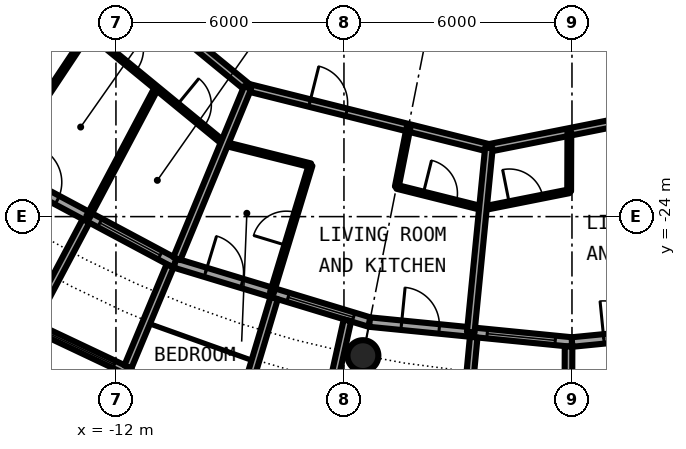
"""IFC4 building model, lengths in metres.
Left out: names, types, materials, properties, quantities, classifications, styles, units other than length and angle.
Written with IfcOpenShell. Run it as: python <this file> out.ifc"""

import sys

from ifc_helpers import new_model, si_unit, direction, frame, frame_2d, origin, origin_2d, place, context, subcontext, project, spatial, rectangle, circle, hollow_circle, extrude, element, fill, save


model = new_model("IFC4")
c1 = context("Model", 3, precision=1e-05, world=origin(), true_north=direction((0.0, 1.0)))
c2 = subcontext(c1, "Body", "Model", "MODEL_VIEW")
j1 = project(units=[si_unit("LENGTHUNIT", "METRE"), si_unit("PLANEANGLEUNIT", "RADIAN")], contexts=[c1])
p1 = place(None, origin())
s1 = spatial("IfcSite", under=j1, at=p1, CompositionType="ELEMENT")
p2 = place(p1, origin())
s2 = spatial("IfcBuilding", under=s1, at=p2, CompositionType="ELEMENT")
p3 = place(p2, frame((0.0, 0.0, 227.95)))
s3 = spatial("IfcBuildingStorey", under=s2, at=p3, CompositionType="ELEMENT", Elevation=227.95)
p4 = place(p3, frame((-5.501, -27.658, 0.0), z_axis=(0.0, 0.0, 1.0), x_axis=(1.0, 0.0, 0.0)))
e1 = element("IfcColumn", 1, at=p4, inside=s3, PredefinedType="COLUMN", context=c2, shape_type="SweptSolid", body=[
    extrude(hollow_circle(Radius=0.406, WallThickness=0.03, at=origin_2d()), origin(), (0.0, 0.0, 1.0), 3.05),
])
p5 = place(p3, frame((-15.167, -22.699, 0.0), z_axis=(0.0, 0.0, 1.0), x_axis=(0.881915646801, -0.471407246368, 0.0)))
e2 = element("IfcWall", 2, at=p5, inside=s3, PredefinedType="SOLIDWALL", context=c2, shape_type="SweptSolid", body=[
    extrude(rectangle(XDim=5.352, YDim=0.25, at=frame_2d((2.676, 0.0))), origin(), (0.0, 0.0, 1.0), 2.7),
])
p6 = place(p5, frame((0.841, 0.0, 0.0)))
e3 = element("IfcOpeningElement", 3, at=p6, cuts=e2, PredefinedType="OPENING", context=c2, shape_type="SweptSolid", body=[
    extrude(rectangle(XDim=1.0, YDim=2.2, at=frame_2d((0.5, 1.1))), frame((0.0, 0.135, 0.0), z_axis=(0.0, -1.0, 0.0), x_axis=(1.0, 0.0, 0.0)), (0.0, 0.0, 1.0), 0.27),
])
p7 = place(p5, frame((3.111, 0.0, 0.3)))
e4 = element("IfcOpeningElement", 4, at=p7, cuts=e2, PredefinedType="OPENING", context=c2, shape_type="SweptSolid", body=[
    extrude(rectangle(XDim=1.8, YDim=2.1, at=frame_2d((0.9, 1.05))), frame((0.0, 0.135, 0.0), z_axis=(0.0, -1.0, 0.0), x_axis=(1.0, 0.0, 0.0)), (0.0, 0.0, 1.0), 0.27),
])
p8 = place(p3, frame((-14.335, -26.808, -0.03), z_axis=(0.0, 0.0, 1.0), x_axis=(0.904000060331, -0.427532327342, 0.0)))
e5 = element("IfcWall", 5, at=p8, inside=s3, PredefinedType="SOLIDWALL", context=c2, shape_type="SweptSolid", body=[
    extrude(rectangle(XDim=2.993, YDim=0.2, at=frame_2d((1.497, 0.0))), origin(), (0.0, 0.0, 1.0), 2.73),
])
p9 = place(p8, frame((0.457, 0.0, 0.33)))
e6 = element("IfcOpeningElement", 6, at=p9, cuts=e5, PredefinedType="OPENING", context=c2, shape_type="SweptSolid", body=[
    extrude(circle(Radius=1.04, at=frame_2d((1.04, 1.04))), frame((0.0, 0.11, 0.0), z_axis=(0.0, -1.0, 0.0), x_axis=(1.0, 0.0, 0.0)), (0.0, 0.0, 1.0), 0.22),
])
p10 = place(p3, frame((-12.787, -24.113, -0.03), z_axis=(0.0, 0.0, 1.0), x_axis=(-0.468365282436, -0.883534924159, 0.0)))
e7 = element("IfcWall", 7, at=p10, inside=s3, PredefinedType="SOLIDWALL", context=c2, shape_type="SweptSolid", body=[
    extrude(rectangle(XDim=3.006, YDim=0.2, at=frame_2d((1.503, 0.0))), origin(), (0.0, 0.0, 1.0), 2.73),
])
p11 = place(p3, frame((-10.575, -25.295, -0.03), z_axis=(0.0, 0.0, 1.0), x_axis=(-0.385697364644, -0.922625353492, 0.0)))
e8 = element("IfcWall", 8, at=p11, inside=s3, PredefinedType="SOLIDWALL", context=c2, shape_type="SweptSolid", body=[
    extrude(rectangle(XDim=2.883, YDim=0.2, at=frame_2d((1.442, 0.0))), origin(), (0.0, 0.0, 1.0), 2.73),
])
p12 = place(p3, frame((-10.447, -25.222, 0.0), z_axis=(0.0, 0.0, 1.0), x_axis=(0.956965678721, -0.290201119486, 0.0)))
e9 = element("IfcWall", 9, at=p12, inside=s3, PredefinedType="SOLIDWALL", context=c2, shape_type="SweptSolid", body=[
    extrude(rectangle(XDim=5.351, YDim=0.25, at=frame_2d((2.676, 0.0))), origin(), (0.0, 0.0, 1.0), 2.7),
])
p13 = place(p12, frame((0.841, 0.0, 0.0)))
e10 = element("IfcOpeningElement", 10, at=p13, cuts=e9, PredefinedType="OPENING", context=c2, shape_type="SweptSolid", body=[
    extrude(rectangle(XDim=1.0, YDim=2.2, at=frame_2d((0.5, 1.1))), frame((0.0, 0.135, 0.0), z_axis=(0.0, -1.0, 0.0), x_axis=(1.0, 0.0, 0.0)), (0.0, 0.0, 1.0), 0.27),
])
p14 = place(p12, frame((3.111, 0.0, 0.3)))
e11 = element("IfcOpeningElement", 11, at=p14, cuts=e9, PredefinedType="OPENING", context=c2, shape_type="SweptSolid", body=[
    extrude(rectangle(XDim=1.8, YDim=2.1, at=frame_2d((0.9, 1.05))), frame((0.0, 0.135, 0.0), z_axis=(0.0, -1.0, 0.0), x_axis=(1.0, 0.0, 0.0)), (0.0, 0.0, 1.0), 0.27),
])
p15 = place(p3, frame((-7.837, -26.144, -0.03), z_axis=(0.0, 0.0, 1.0), x_axis=(-0.287064767992, -0.957911174889, 0.0)))
e12 = element("IfcWall", 12, at=p15, inside=s3, PredefinedType="SOLIDWALL", context=c2, shape_type="SweptSolid", body=[
    extrude(rectangle(XDim=3.006, YDim=0.2, at=frame_2d((1.503, 0.0))), origin(), (0.0, 0.0, 1.0), 2.73),
])
p16 = place(p3, frame((-5.909, -26.729, -0.03), z_axis=(0.0, 0.0, 1.0), x_axis=(-0.216409053917, -0.976302781612, 0.0)))
e13 = element("IfcWall", 13, at=p16, inside=s3, PredefinedType="SOLIDWALL", context=c2, shape_type="SweptSolid", body=[
    extrude(rectangle(XDim=2.925, YDim=0.2, at=frame_2d((1.463, 0.0))), origin(), (0.0, 0.0, 1.0), 2.73),
])
p17 = place(p3, frame((-5.326, -26.775, 0.0), z_axis=(0.0, 0.0, 1.0), x_axis=(0.995173996315, -0.098126026407, 0.0)))
e14 = element("IfcWall", 14, at=p17, inside=s3, PredefinedType="SOLIDWALL", context=c2, shape_type="SweptSolid", body=[
    extrude(rectangle(XDim=5.352, YDim=0.25, at=frame_2d((2.676, 0.0))), origin(), (0.0, 0.0, 1.0), 2.7),
])
p18 = place(p17, frame((0.841, 0.0, 0.0)))
e15 = element("IfcOpeningElement", 15, at=p18, cuts=e14, PredefinedType="OPENING", context=c2, shape_type="SweptSolid", body=[
    extrude(rectangle(XDim=1.0, YDim=2.2, at=frame_2d((0.5, 1.1))), frame((0.0, 0.135, 0.0), z_axis=(0.0, -1.0, 0.0), x_axis=(1.0, 0.0, 0.0)), (0.0, 0.0, 1.0), 0.27),
])
p19 = place(p17, frame((3.111, 0.0, 0.3)))
e16 = element("IfcOpeningElement", 16, at=p19, cuts=e14, PredefinedType="OPENING", context=c2, shape_type="SweptSolid", body=[
    extrude(rectangle(XDim=1.8, YDim=2.1, at=frame_2d((0.9, 1.05))), frame((0.0, 0.135, 0.0), z_axis=(0.0, -1.0, 0.0), x_axis=(1.0, 0.0, 0.0)), (0.0, 0.0, 1.0), 0.27),
])
p20 = place(p3, frame((-2.586, -27.171, -0.03), z_axis=(0.0, 0.0, 1.0), x_axis=(-0.094548432284, -0.995520262954, 0.0)))
e17 = element("IfcWall", 17, at=p20, inside=s3, PredefinedType="SOLIDWALL", context=c2, shape_type="SweptSolid", body=[
    extrude(rectangle(XDim=3.006, YDim=0.2, at=frame_2d((1.503, 0.0))), origin(), (0.0, 0.0, 1.0), 2.73),
])
p21 = place(p3, frame((-0.09, -27.417, -0.03), z_axis=(0.0, 0.0, 1.0), x_axis=(-0.00347308367, -0.999993968827, 0.0)))
e18 = element("IfcWall", 18, at=p21, inside=s3, PredefinedType="SOLIDWALL", context=c2, shape_type="SweptSolid", body=[
    extrude(rectangle(XDim=2.882, YDim=0.2, at=frame_2d((1.441, 0.0))), origin(), (0.0, 0.0, 1.0), 2.73),
])
p22 = place(p3, frame((0.0, -27.3, 0.0), z_axis=(0.0, 0.0, 1.0), x_axis=(0.995173996315, 0.098126026407, 0.0)))
e19 = element("IfcWall", 19, at=p22, inside=s3, PredefinedType="SOLIDWALL", context=c2, shape_type="SweptSolid", body=[
    extrude(rectangle(XDim=5.352, YDim=0.25, at=frame_2d((2.676, 0.0))), origin(), (0.0, 0.0, 1.0), 2.7),
])
p23 = place(p22, frame((0.841, 0.0, 0.0)))
e20 = element("IfcOpeningElement", 20, at=p23, cuts=e19, PredefinedType="OPENING", context=c2, shape_type="SweptSolid", body=[
    extrude(rectangle(XDim=1.0, YDim=2.2, at=frame_2d((0.5, 1.1))), frame((0.0, 0.135, 0.0), z_axis=(0.0, -1.0, 0.0), x_axis=(1.0, 0.0, 0.0)), (0.0, 0.0, 1.0), 0.27),
])
p24 = place(p22, frame((3.111, 0.0, 0.3)))
e21 = element("IfcOpeningElement", 21, at=p24, cuts=e19, PredefinedType="OPENING", context=c2, shape_type="SweptSolid", body=[
    extrude(rectangle(XDim=1.8, YDim=2.1, at=frame_2d((0.9, 1.05))), frame((0.0, 0.135, 0.0), z_axis=(0.0, -1.0, 0.0), x_axis=(1.0, 0.0, 0.0)), (0.0, 0.0, 1.0), 0.27),
])
p25 = place(p3, frame((-9.146, -22.081, 0.0), z_axis=(0.0, 0.0, 1.0), x_axis=(0.9700564467, -0.242879579658, 0.0)))
e22 = element("IfcWall", 22, at=p25, inside=s3, PredefinedType="PARTITIONING", context=c2, shape_type="SweptSolid", body=[
    extrude(rectangle(XDim=2.338, YDim=0.1, at=frame_2d((1.169, 0.0))), origin(), (0.0, 0.0, 1.0), 2.7),
])
p26 = place(p3, frame((-4.608, -23.218, 0.0), z_axis=(0.0, 0.0, 1.0), x_axis=(0.970124059177, -0.242609376996, 0.0)))
e23 = element("IfcWall", 23, at=p26, inside=s3, PredefinedType="PARTITIONING", context=c2, shape_type="SweptSolid", body=[
    extrude(rectangle(XDim=2.337, YDim=0.1, at=frame_2d((1.168, 0.0))), origin(), (0.0, 0.0, 1.0), 2.7),
])
p27 = place(p26, frame((0.716, 0.0, 0.0)))
e24 = element("IfcOpeningElement", 24, at=p27, cuts=e23, PredefinedType="OPENING", context=c2, shape_type="SweptSolid", body=[
    extrude(rectangle(XDim=0.9, YDim=2.3, at=frame_2d((0.45, 1.15))), frame((0.0, 0.06, 0.0), z_axis=(0.0, -1.0, 0.0), x_axis=(1.0, 0.0, 0.0)), (0.0, 0.0, 1.0), 0.12),
])
p28 = place(p3, frame((-14.509, -17.679, 0.0), z_axis=(0.0, 0.0, 1.0), x_axis=(0.772956112865, -0.634459492469, 0.0)))
e25 = element("IfcWall", 25, at=p28, inside=s3, PredefinedType="PARTITIONING", context=c2, shape_type="SweptSolid", body=[
    extrude(rectangle(XDim=6.938, YDim=0.1, at=frame_2d((3.469, 0.0))), origin(), (0.0, 0.0, 1.0), 2.7),
])
p29 = place(p28, frame((3.02, 0.0, 0.0)))
e26 = element("IfcOpeningElement", 26, at=p29, cuts=e25, PredefinedType="OPENING", context=c2, shape_type="SweptSolid", body=[
    extrude(rectangle(XDim=0.9, YDim=2.3, at=frame_2d((0.45, 1.15))), frame((0.0, 0.06, 0.0), z_axis=(0.0, -1.0, 0.0), x_axis=(1.0, 0.0, 0.0)), (0.0, 0.0, 1.0), 0.12),
])
p30 = place(p28, frame((5.33, 0.0, 0.0)))
e27 = element("IfcOpeningElement", 27, at=p30, cuts=e25, PredefinedType="OPENING", context=c2, shape_type="SweptSolid", body=[
    extrude(rectangle(XDim=0.9, YDim=2.3, at=frame_2d((0.45, 1.15))), frame((0.0, 0.06, 0.0), z_axis=(0.0, -1.0, 0.0), x_axis=(1.0, 0.0, 0.0)), (0.0, 0.0, 1.0), 0.12),
])
p31 = place(p3, frame((-2.343, -23.785, 0.0), z_axis=(0.0, 0.0, 1.0), x_axis=(0.98081942231, 0.194918600496, 0.0)))
e28 = element("IfcWall", 28, at=p31, inside=s3, PredefinedType="PARTITIONING", context=c2, shape_type="SweptSolid", body=[
    extrude(rectangle(XDim=2.313, YDim=0.1, at=frame_2d((1.157, 0.0))), origin(), (0.0, 0.0, 1.0), 2.7),
])
p32 = place(p31, frame((0.707, 0.0, 0.0)))
e29 = element("IfcOpeningElement", 29, at=p32, cuts=e28, PredefinedType="OPENING", context=c2, shape_type="SweptSolid", body=[
    extrude(rectangle(XDim=0.9, YDim=2.3, at=frame_2d((0.45, 1.15))), frame((0.0, 0.06, 0.0), z_axis=(0.0, -1.0, 0.0), x_axis=(1.0, 0.0, 0.0)), (0.0, 0.0, 1.0), 0.12),
])
p33 = place(p3, frame((-8.534, -20.603, 0.0), z_axis=(0.0, 0.0, 1.0), x_axis=(0.97003047456, -0.242983288366, 0.0)))
e30 = element("IfcWall", 30, at=p33, inside=s3, PredefinedType="PARTITIONING", context=c2, shape_type="SweptSolid", body=[
    extrude(rectangle(XDim=6.544, YDim=0.2, at=frame_2d((3.272, 0.0))), origin(), (0.0, 0.0, 1.0), 2.7),
])
p34 = place(p33, frame((1.681, 0.0, 0.0)))
e31 = element("IfcOpeningElement", 31, at=p34, cuts=e30, PredefinedType="OPENING", context=c2, shape_type="SweptSolid", body=[
    extrude(rectangle(XDim=1.0, YDim=2.3, at=frame_2d((0.5, 1.15))), frame((0.0, 0.11, 0.0), z_axis=(0.0, -1.0, 0.0), x_axis=(1.0, 0.0, 0.0)), (0.0, 0.0, 1.0), 0.22),
])
p35 = place(p3, frame((-18.542, -12.389, 0.0), z_axis=(0.0, 0.0, 1.0), x_axis=(0.772983503654, -0.634426121056, 0.0)))
e32 = element("IfcWall", 32, at=p35, inside=s3, PredefinedType="PARTITIONING", context=c2, shape_type="SweptSolid", body=[
    extrude(rectangle(XDim=12.947, YDim=0.2, at=frame_2d((6.474, 0.0))), origin(), (0.0, 0.0, 1.0), 2.7),
])
p36 = place(p35, frame((7.053, 0.0, 0.0)))
e33 = element("IfcOpeningElement", 33, at=p36, cuts=e32, PredefinedType="OPENING", context=c2, shape_type="SweptSolid", body=[
    extrude(rectangle(XDim=1.0, YDim=2.3, at=frame_2d((0.5, 1.15))), frame((0.0, 0.11, 0.0), z_axis=(0.0, -1.0, 0.0), x_axis=(1.0, 0.0, 0.0)), (0.0, 0.0, 1.0), 0.22),
])
p37 = place(p3, frame((-2.186, -22.193, 0.0), z_axis=(0.0, 0.0, 1.0), x_axis=(0.980780341017, 0.195115152343, 0.0)))
e34 = element("IfcWall", 34, at=p37, inside=s3, PredefinedType="PARTITIONING", context=c2, shape_type="SweptSolid", body=[
    extrude(rectangle(XDim=12.947, YDim=0.2, at=frame_2d((6.473, 0.0))), origin(), (0.0, 0.0, 1.0), 2.7),
])
p38 = place(p37, frame((7.053, 0.0, 0.0)))
e35 = element("IfcOpeningElement", 35, at=p38, cuts=e34, PredefinedType="OPENING", context=c2, shape_type="SweptSolid", body=[
    extrude(rectangle(XDim=1.0, YDim=2.3, at=frame_2d((0.5, 1.15))), frame((0.0, 0.11, 0.0), z_axis=(0.0, -1.0, 0.0), x_axis=(1.0, 0.0, 0.0)), (0.0, 0.0, 1.0), 0.22),
])
p39 = place(p3, frame((-15.039, -22.634, 0.0), z_axis=(0.0, 0.0, 1.0), x_axis=(0.553609857728, 0.832776155654, 0.0)))
e36 = element("IfcWall", 36, at=p39, inside=s3, PredefinedType="PARTITIONING", context=c2, shape_type="SweptSolid", body=[
    extrude(rectangle(XDim=4.187, YDim=0.1, at=frame_2d((2.094, 0.0))), origin(), (0.0, 0.0, 1.0), 2.7),
])
p40 = place(p3, frame((-12.734, -24.007, 0.0), z_axis=(0.0, 0.0, 1.0), x_axis=(0.468594334564, 0.883413464701, 0.0)))
e37 = element("IfcWall", 37, at=p40, inside=s3, PredefinedType="PARTITIONING", context=c2, shape_type="SweptSolid", body=[
    extrude(rectangle(XDim=3.841, YDim=0.1, at=frame_2d((1.92, 0.0))), origin(), (0.0, 0.0, 1.0), 2.7),
])
p41 = place(p3, frame((-10.399, -25.106, 0.0), z_axis=(0.0, 0.0, 1.0), x_axis=(0.382651153718, 0.923892902104, 0.0)))
e38 = element("IfcWall", 38, at=p41, inside=s3, PredefinedType="PARTITIONING", context=c2, shape_type="SweptSolid", body=[
    extrude(rectangle(XDim=4.874, YDim=0.2, at=frame_2d((2.437, 0.0))), origin(), (0.0, 0.0, 1.0), 2.7),
])
p42 = place(p3, frame((-7.897, -26.002, 0.0), z_axis=(0.0, 0.0, 1.0), x_axis=(0.290784578865, 0.956788549625, 0.0)))
e39 = element("IfcWall", 39, at=p42, inside=s3, PredefinedType="PARTITIONING", context=c2, shape_type="SweptSolid", body=[
    extrude(rectangle(XDim=3.504, YDim=0.1, at=frame_2d((1.752, 0.0))), origin(), (0.0, 0.0, 1.0), 2.7),
])
p43 = place(p42, frame((1.302, 0.0, 0.0)))
e40 = element("IfcOpeningElement", 40, at=p43, cuts=e39, PredefinedType="OPENING", context=c2, shape_type="SweptSolid", body=[
    extrude(rectangle(XDim=0.9, YDim=2.3, at=frame_2d((0.45, 1.15))), frame((0.0, 0.06, 0.0), z_axis=(0.0, -1.0, 0.0), x_axis=(1.0, 0.0, 0.0)), (0.0, 0.0, 1.0), 0.12),
])
p44 = place(p3, frame((-2.664, -27.044, 0.0), z_axis=(0.0, 0.0, 1.0), x_axis=(0.098070432075, 0.995179476453, 0.0)))
e41 = element("IfcWall", 41, at=p44, inside=s3, PredefinedType="PARTITIONING", context=c2, shape_type="SweptSolid", body=[
    extrude(rectangle(XDim=4.874, YDim=0.2, at=frame_2d((2.437, 0.0))), origin(), (0.0, 0.0, 1.0), 2.7),
])
p45 = place(p3, frame((-0.074, -23.334, 0.0), z_axis=(0.0, 0.0, 1.0), x_axis=(0.003125961595, 0.99999511417, 0.0)))
e42 = element("IfcWall", 42, at=p45, inside=s3, PredefinedType="PARTITIONING", context=c2, shape_type="SweptSolid", body=[
    extrude(rectangle(XDim=1.562, YDim=0.1, at=frame_2d((0.781, 0.0))), origin(), (0.0, 0.0, 1.0), 2.7),
])
p46 = place(p3, frame((-4.61, -23.217, 0.0), z_axis=(0.0, 0.0, 1.0), x_axis=(0.194485862594, 0.980905321247, 0.0)))
e43 = element("IfcWall", 43, at=p46, inside=s3, PredefinedType="PARTITIONING", context=c2, shape_type="SweptSolid", body=[
    extrude(rectangle(XDim=1.584, YDim=0.1, at=frame_2d((0.792, 0.0))), origin(), (0.0, 0.0, 1.0), 2.7),
])
p47 = place(p6, origin())
e44 = element("IfcDoor", 44, at=p47, inside=s3, OperationType="SINGLE_SWING_LEFT", PredefinedType="DOOR", context=c2, shape_type="SweptSolid", body=[
    extrude(rectangle(XDim=1.0, YDim=2.2, at=frame_2d((0.5, 1.1))), frame((0.0, 0.025, 0.0), z_axis=(0.0, -1.0, 0.0), x_axis=(1.0, 0.0, 0.0)), (0.0, 0.0, 1.0), 0.05),
])
fill(e3, e44)
p48 = place(p7, origin())
e45 = element("IfcWindow", 45, at=p48, inside=s3, PartitioningType="SINGLE_PANEL", PredefinedType="WINDOW", context=c2, shape_type="SweptSolid", body=[
    extrude(rectangle(XDim=1.8, YDim=2.1, at=frame_2d((0.9, 1.05))), frame((0.0, 0.03, 0.0), z_axis=(0.0, -1.0, 0.0), x_axis=(1.0, 0.0, 0.0)), (0.0, 0.0, 1.0), 0.06),
])
fill(e4, e45)
p49 = place(p9, origin())
e46 = element("IfcWindow", 46, at=p49, inside=s3, PartitioningType="SINGLE_PANEL", PredefinedType="WINDOW", context=c2, shape_type="SweptSolid", body=[
    extrude(circle(Radius=1.04, at=frame_2d((1.04, 1.04))), frame((0.0, 0.03, 0.0), z_axis=(0.0, -1.0, 0.0), x_axis=(1.0, 0.0, 0.0)), (0.0, 0.0, 1.0), 0.06),
])
fill(e6, e46)
p50 = place(p13, origin())
e47 = element("IfcDoor", 47, at=p50, inside=s3, OperationType="SINGLE_SWING_LEFT", PredefinedType="DOOR", context=c2, shape_type="SweptSolid", body=[
    extrude(rectangle(XDim=1.0, YDim=2.2, at=frame_2d((0.5, 1.1))), frame((0.0, 0.025, 0.0), z_axis=(0.0, -1.0, 0.0), x_axis=(1.0, 0.0, 0.0)), (0.0, 0.0, 1.0), 0.05),
])
fill(e10, e47)
p51 = place(p14, origin())
e48 = element("IfcWindow", 48, at=p51, inside=s3, PartitioningType="SINGLE_PANEL", PredefinedType="WINDOW", context=c2, shape_type="SweptSolid", body=[
    extrude(rectangle(XDim=1.8, YDim=2.1, at=frame_2d((0.9, 1.05))), frame((0.0, 0.03, 0.0), z_axis=(0.0, -1.0, 0.0), x_axis=(1.0, 0.0, 0.0)), (0.0, 0.0, 1.0), 0.06),
])
fill(e11, e48)
p52 = place(p18, origin())
e49 = element("IfcDoor", 49, at=p52, inside=s3, OperationType="SINGLE_SWING_LEFT", PredefinedType="DOOR", context=c2, shape_type="SweptSolid", body=[
    extrude(rectangle(XDim=1.0, YDim=2.2, at=frame_2d((0.5, 1.1))), frame((0.0, 0.025, 0.0), z_axis=(0.0, -1.0, 0.0), x_axis=(1.0, 0.0, 0.0)), (0.0, 0.0, 1.0), 0.05),
])
fill(e15, e49)
p53 = place(p19, origin())
e50 = element("IfcWindow", 50, at=p53, inside=s3, PartitioningType="SINGLE_PANEL", PredefinedType="WINDOW", context=c2, shape_type="SweptSolid", body=[
    extrude(rectangle(XDim=1.8, YDim=2.1, at=frame_2d((0.9, 1.05))), frame((0.0, 0.03, 0.0), z_axis=(0.0, -1.0, 0.0), x_axis=(1.0, 0.0, 0.0)), (0.0, 0.0, 1.0), 0.06),
])
fill(e16, e50)
p54 = place(p23, origin())
e51 = element("IfcDoor", 51, at=p54, inside=s3, OperationType="SINGLE_SWING_LEFT", PredefinedType="DOOR", context=c2, shape_type="SweptSolid", body=[
    extrude(rectangle(XDim=1.0, YDim=2.2, at=frame_2d((0.5, 1.1))), frame((0.0, 0.025, 0.0), z_axis=(0.0, -1.0, 0.0), x_axis=(1.0, 0.0, 0.0)), (0.0, 0.0, 1.0), 0.05),
])
fill(e20, e51)
p55 = place(p29, origin())
e52 = element("IfcDoor", 52, at=p55, inside=s3, OperationType="SINGLE_SWING_RIGHT", PredefinedType="DOOR", context=c2, shape_type="SweptSolid", body=[
    extrude(rectangle(XDim=0.9, YDim=2.3, at=frame_2d((0.45, 1.15))), frame((0.0, 0.025, 0.0), z_axis=(0.0, -1.0, 0.0), x_axis=(1.0, 0.0, 0.0)), (0.0, 0.0, 1.0), 0.05),
])
fill(e26, e52)
p56 = place(p30, origin())
e53 = element("IfcDoor", 53, at=p56, inside=s3, OperationType="SINGLE_SWING_RIGHT", PredefinedType="DOOR", context=c2, shape_type="SweptSolid", body=[
    extrude(rectangle(XDim=0.9, YDim=2.3, at=frame_2d((0.45, 1.15))), frame((0.0, 0.025, 0.0), z_axis=(0.0, -1.0, 0.0), x_axis=(1.0, 0.0, 0.0)), (0.0, 0.0, 1.0), 0.05),
])
fill(e27, e53)
p57 = place(p34, origin())
e54 = element("IfcDoor", 54, at=p57, inside=s3, OperationType="SINGLE_SWING_LEFT", PredefinedType="DOOR", context=c2, shape_type="SweptSolid", body=[
    extrude(rectangle(XDim=1.0, YDim=2.3, at=frame_2d((0.5, 1.15))), frame((0.0, 0.025, 0.0), z_axis=(0.0, -1.0, 0.0), x_axis=(1.0, 0.0, 0.0)), (0.0, 0.0, 1.0), 0.05),
])
fill(e31, e54)
p58 = place(p27, origin())
e55 = element("IfcDoor", 55, at=p58, inside=s3, OperationType="SINGLE_SWING_LEFT", PredefinedType="DOOR", context=c2, shape_type="SweptSolid", body=[
    extrude(rectangle(XDim=0.9, YDim=2.3, at=frame_2d((0.45, 1.15))), frame((0.0, 0.025, 0.0), z_axis=(0.0, -1.0, 0.0), x_axis=(1.0, 0.0, 0.0)), (0.0, 0.0, 1.0), 0.05),
])
fill(e24, e55)
p59 = place(p43, origin())
e56 = element("IfcDoor", 56, at=p59, inside=s3, OperationType="SINGLE_SWING_RIGHT", PredefinedType="DOOR", context=c2, shape_type="SweptSolid", body=[
    extrude(rectangle(XDim=0.9, YDim=2.3, at=frame_2d((0.45, 1.15))), frame((0.0, 0.025, 0.0), z_axis=(0.0, -1.0, 0.0), x_axis=(1.0, 0.0, 0.0)), (0.0, 0.0, 1.0), 0.05),
])
fill(e40, e56)
p60 = place(p32, origin())
e57 = element("IfcDoor", 57, at=p60, inside=s3, OperationType="SINGLE_SWING_LEFT", PredefinedType="DOOR", context=c2, shape_type="SweptSolid", body=[
    extrude(rectangle(XDim=0.9, YDim=2.3, at=frame_2d((0.45, 1.15))), frame((0.0, 0.025, 0.0), z_axis=(0.0, -1.0, 0.0), x_axis=(1.0, 0.0, 0.0)), (0.0, 0.0, 1.0), 0.05),
])
fill(e29, e57)
save(model, sys.argv[1])
